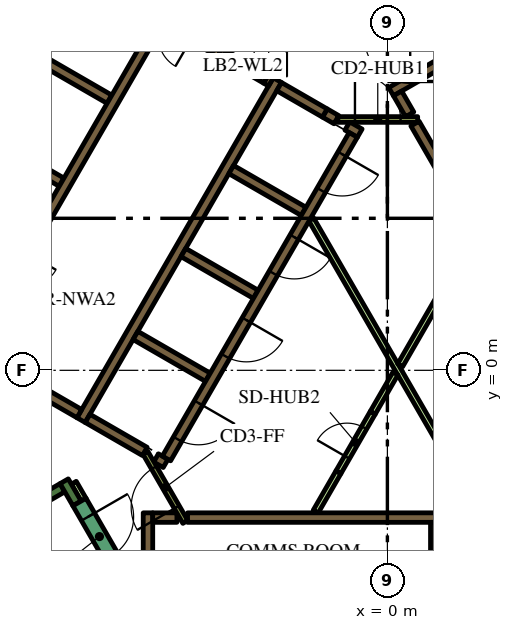
"""IFC4 building model, lengths in metres.
Left out: names, types, materials, properties, quantities, classifications, styles, units other than length and angle.
Written with IfcOpenShell. Run it as: python <this file> out.ifc"""

import sys

from ifc_helpers import new_model, si_unit, direction, frame, frame_2d, origin, place, context, subcontext, project, spatial, polyline, rectangle, outline, extrude, element, fill, save


model = new_model("IFC4")
c1 = context("Model", 3, precision=1e-05, world=origin(), true_north=direction((0.0, 1.0)))
c2 = subcontext(c1, "Body", "Model", "MODEL_VIEW")
j1 = project(units=[si_unit("LENGTHUNIT", "METRE"), si_unit("PLANEANGLEUNIT", "RADIAN")], contexts=[c1])
p1 = place(None, origin())
s1 = spatial("IfcSite", under=j1, at=p1, CompositionType="ELEMENT")
p2 = place(p1, origin())
s2 = spatial("IfcBuilding", under=s1, at=p2, CompositionType="ELEMENT")
p3 = place(p2, frame((0.0, 0.0, 51.0)))
s3 = spatial("IfcBuildingStorey", under=s2, at=p3, CompositionType="ELEMENT", Elevation=51.0)
p4 = place(p3, frame((-15.36, -1.503, 0.0), z_axis=(0.0, 0.0, 1.0), x_axis=(0.50000389221, 0.866023156604, 0.0)))
e1 = element("IfcWall", 1, at=p4, inside=s3, PredefinedType="SOLIDWALL", context=c2, shape_type="SweptSolid", body=[
    extrude(rectangle(XDim=21.0, YDim=0.9, at=frame_2d((10.5, 0.0))), origin(), (0.0, 0.0, 1.0), 3.9),
])
p5 = place(p3, frame((-14.44, -6.49, 0.0), z_axis=(0.0, 0.0, 1.0), x_axis=(0.866022966069, 0.500004222222, 0.0)))
e2 = element("IfcWall", 2, at=p5, inside=s3, PredefinedType="SOLIDWALL", context=c2, shape_type="SweptSolid", body=[
    extrude(rectangle(XDim=6.8, YDim=0.25, at=frame_2d((3.4, 0.0))), origin(), (0.0, 0.0, 1.0), 3.9),
])
p6 = place(p3, frame((-8.168, -3.503, 0.0), z_axis=(0.0, 0.0, 1.0), x_axis=(-0.499952099219, 0.866053057547, 0.0)))
e3 = element("IfcWall", 3, at=p6, inside=s3, PredefinedType="SOLIDWALL", context=c2, shape_type="SweptSolid", body=[
    extrude(rectangle(XDim=0.675, YDim=0.25, at=frame_2d((0.337, 0.0))), origin(), (0.0, 0.0, 1.0), 3.9),
])
p7 = place(p3, frame((-5.259, -3.875, 0.0), z_axis=(0.0, 0.0, 1.0), x_axis=(1.0, 0.0, 0.0)))
e4 = element("IfcWall", 4, at=p7, inside=s3, PredefinedType="SOLIDWALL", context=c2, shape_type="SweptSolid", body=[
    extrude(rectangle(XDim=10.489, YDim=0.25, at=frame_2d((5.244, 0.0))), origin(), (0.0, 0.0, 1.0), 3.9),
])
p8 = place(p3, frame((1.26, -4.0, 0.0), z_axis=(0.0, 0.0, 1.0), x_axis=(0.0, -1.0, 0.0)))
e5 = element("IfcWall", 5, at=p8, inside=s3, PredefinedType="SOLIDWALL", context=c2, shape_type="SweptSolid", body=[
    extrude(rectangle(XDim=2.2, YDim=0.25, at=frame_2d((1.1, 0.0))), origin(), (0.0, 0.0, 1.0), 3.9),
])
p9 = place(p3, frame((-6.3, -3.75, 0.0), z_axis=(0.0, 0.0, 1.0), x_axis=(0.0, -1.0, 0.0)))
e6 = element("IfcWall", 6, at=p9, inside=s3, PredefinedType="SOLIDWALL", context=c2, shape_type="SweptSolid", body=[
    extrude(rectangle(XDim=3.404, YDim=0.25, at=frame_2d((1.702, 0.0))), origin(), (0.0, 0.0, 1.0), 3.9),
])
p10 = place(p3, frame((-6.175, -3.875, 0.0), z_axis=(0.0, 0.0, 1.0), x_axis=(1.0, 0.0, 0.0)))
e7 = element("IfcWall", 7, at=p10, inside=s3, PredefinedType="SOLIDWALL", context=c2, shape_type="SweptSolid", body=[
    extrude(rectangle(XDim=0.637, YDim=0.25, at=frame_2d((0.318, 0.0))), origin(), (0.0, 0.0, 1.0), 3.9),
])
p11 = place(p3, origin())
e8 = element("IfcWall", 8, at=p11, inside=s3, PredefinedType="SOLIDWALL", context=c2, shape_type="SweptSolid", body=[
    extrude(outline(polyline([(2.776, 8.733), (2.499, 8.573), (2.498, 8.573), (2.498, 8.573), (2.282, 8.448), (2.282, 8.448), (0.377, 7.348), (0.16, 7.223), (0.035, 7.439), (3.032, 9.169), (3.03, 9.152), (3.03, 9.133), (3.031, 9.113), (3.035, 9.094), (3.04, 9.075), (3.047, 9.057), (3.056, 9.039), (3.119, 8.931), (2.776, 8.733)])), origin(), (0.0, 0.0, 1.0), 3.9),
])
p12 = place(p3, frame((0.268, 7.285, 0.0), z_axis=(0.0, 0.0, 1.0), x_axis=(0.500098681536, -0.865968422476, 0.0)))
e9 = element("IfcWall", 9, at=p12, inside=s3, PredefinedType="SOLIDWALL", context=c2, shape_type="SweptSolid", body=[
    extrude(rectangle(XDim=0.636, YDim=0.25, at=frame_2d((0.318, 0.0))), origin(), (0.0, 0.0, 1.0), 3.9),
])
p13 = place(p3, frame((5.97, -2.591, 0.0), z_axis=(0.0, 0.0, 1.0), x_axis=(-0.499994469932, 0.866028596547, 0.0)))
e10 = element("IfcWall", 10, at=p13, inside=s3, PredefinedType="SOLIDWALL", context=c2, shape_type="SweptSolid", body=[
    extrude(rectangle(XDim=10.488, YDim=0.25, at=frame_2d((5.244, 0.0))), origin(), (0.0, 0.0, 1.0), 3.9),
])
p14 = place(p3, frame((-8.06, -1.311, 0.0), z_axis=(0.0, 0.0, 1.0), x_axis=(0.50000273126, 0.866023826885, 0.0)))
e11 = element("IfcWall", 11, at=p14, inside=s3, PredefinedType="SOLIDWALL", context=c2, shape_type="SweptSolid", body=[
    extrude(rectangle(XDim=10.33, YDim=0.25, at=frame_2d((5.165, 0.0))), origin(), (0.0, 0.0, 1.0), 3.9),
])
p15 = place(p3, frame((-1.342, 6.595, 0.0), z_axis=(0.0, 0.0, 1.0), x_axis=(-0.866046247233, 0.49996389635, 0.0)))
e12 = element("IfcWall", 12, at=p15, inside=s3, PredefinedType="SOLIDWALL", context=c2, shape_type="SweptSolid", body=[
    extrude(rectangle(XDim=0.35, YDim=0.25, at=frame_2d((0.175, 0.0))), origin(), (0.0, 0.0, 1.0), 3.9),
])
p16 = place(p3, frame((-1.647, 6.771, 0.0), z_axis=(0.0, 0.0, 1.0), x_axis=(-0.865971728693, 0.500092956464, 0.0)))
e13 = element("IfcWall", 13, at=p16, inside=s3, PredefinedType="SOLIDWALL", context=c2, shape_type="SweptSolid", body=[
    extrude(rectangle(XDim=1.388, YDim=0.25, at=frame_2d((0.694, 0.0))), origin(), (0.0, 0.0, 1.0), 3.9),
])
p17 = place(p3, frame((-0.728, 6.24, 0.0), z_axis=(0.0, 0.0, 1.0), x_axis=(-0.866088799389, 0.499890179513, 0.0)))
e14 = element("IfcWall", 14, at=p17, inside=s3, PredefinedType="SOLIDWALL", context=c2, shape_type="SweptSolid", body=[
    extrude(rectangle(XDim=0.378, YDim=0.25, at=frame_2d((0.189, 0.0))), origin(), (0.0, 0.0, 1.0), 3.9),
])
for number, where, z_axis, x_axis in (
    (15, (-2.204, 4.182, 0.0), (0.0, 0.0, 1.0), (-0.866, 0.5, 0.0)),
    (16, (-5.369, 3.1, 0.0), (0.0, 0.0, 1.0), (0.866, -0.5, 0.0)),
    (17, (-4.724, -0.182, 0.0), (0.0, 0.0, 1.0), (-0.866, 0.5, 0.0)),
):
    element("IfcWall", number, at=place(p3, frame(where, z_axis=z_axis, x_axis=x_axis)), inside=s3, PredefinedType="SOLIDWALL", context=c2, shape_type="SweptSolid", body=[
        extrude(rectangle(XDim=2.2, YDim=0.25, at=frame_2d((1.1, 0.0))), origin(), (0.0, 0.0, 1.0), 3.9),
    ])
p18 = place(p3, frame((-6.088, -2.305, 0.0), z_axis=(0.0, 0.0, 1.0), x_axis=(0.866059450854, -0.499941024108, 0.0)))
e18 = element("IfcWall", 18, at=p18, inside=s3, PredefinedType="SOLIDWALL", context=c2, shape_type="SweptSolid", body=[
    extrude(rectangle(XDim=0.29, YDim=0.25, at=frame_2d((0.145, 0.0))), origin(), (0.0, 0.0, 1.0), 3.9),
])
p19 = place(p3, frame((-7.889, -1.265, 0.0), z_axis=(0.0, 0.0, 1.0), x_axis=(0.865986741702, -0.500066958712, 0.0)))
e19 = element("IfcWall", 19, at=p19, inside=s3, PredefinedType="SOLIDWALL", context=c2, shape_type="SweptSolid", body=[
    extrude(rectangle(XDim=1.738, YDim=0.25, at=frame_2d((0.869, 0.0))), origin(), (0.0, 0.0, 1.0), 3.9),
])
p20 = place(p3, frame((-8.106, -1.14, 0.0), z_axis=(0.0, 0.0, 1.0), x_axis=(-0.866000643155, 0.500042884217, 0.0)))
e20 = element("IfcWall", 20, at=p20, inside=s3, PredefinedType="SOLIDWALL", context=c2, shape_type="SweptSolid", body=[
    extrude(rectangle(XDim=5.65, YDim=0.25, at=frame_2d((2.825, 0.0))), origin(), (0.0, 0.0, 1.0), 3.9),
])
e21 = element("IfcWall", 21, at=p11, inside=s3, PredefinedType="SOLIDWALL", context=c2, shape_type="SweptSolid", body=[
    extrude(outline(polyline([(-3.128, 7.481), (-3.259, 7.557), (-3.134, 7.773), (-3.003, 7.698), (-3.128, 7.481)])), origin(), (0.0, 0.0, 1.0), 3.9),
])
for number, where, z_axis, x_axis in (
    (22, (-8.574, 4.95, 0.0), (0.0, 0.0, 1.0), (-0.866, 0.5, 0.0)),
    (23, (-7.314, 7.132, 0.0), (0.0, 0.0, 1.0), (-0.866, 0.5, 0.0)),
):
    element("IfcWall", number, at=place(p3, frame(where, z_axis=z_axis, x_axis=x_axis)), inside=s3, PredefinedType="SOLIDWALL", context=c2, shape_type="SweptSolid", body=[
        extrude(rectangle(XDim=2.2, YDim=0.25, at=frame_2d((1.1, 0.0))), origin(), (0.0, 0.0, 1.0), 3.9),
    ])
p21 = place(p3, frame((-4.409, 8.365, 0.0), z_axis=(0.0, 0.0, 1.0), x_axis=(-0.866057014183, 0.499945245186, 0.0)))
e24 = element("IfcWall", 24, at=p21, inside=s3, PredefinedType="SOLIDWALL", context=c2, shape_type="SweptSolid", body=[
    extrude(rectangle(XDim=0.379, YDim=0.25, at=frame_2d((0.19, 0.0))), origin(), (0.0, 0.0, 1.0), 3.9),
])
p22 = place(p3, frame((-1.887, -3.718, 0.0), z_axis=(0.0, 0.0, 1.0), x_axis=(0.500057179532, 0.865992388649, 0.0)))
e25 = element("IfcWall", 25, at=p22, inside=s3, PredefinedType="PARTITIONING", context=c2, shape_type="SweptSolid", body=[
    extrude(rectangle(XDim=1.199, YDim=0.15, at=frame_2d((0.6, 0.0))), origin(), (0.0, 0.0, 1.0), 2.75),
])
p23 = place(p3, frame((-8.252, -2.958, 0.0), z_axis=(0.0, 0.0, 1.0), x_axis=(0.500174715838, -0.865924508047, 0.0)))
e26 = element("IfcWall", 26, at=p23, inside=s3, PredefinedType="PARTITIONING", context=c2, shape_type="SweptSolid", body=[
    extrude(rectangle(XDim=0.514, YDim=0.15, at=frame_2d((0.257, 0.0))), origin(), (0.0, 0.0, 1.0), 2.75),
])
p24 = place(p3, frame((2.435, -3.718, 0.0), z_axis=(0.0, 0.0, 1.0), x_axis=(-0.499985176046, 0.866033962229, 0.0)))
e27 = element("IfcWall", 27, at=p24, inside=s3, PredefinedType="PARTITIONING", context=c2, shape_type="SweptSolid", body=[
    extrude(rectangle(XDim=8.875, YDim=0.15, at=frame_2d((4.438, 0.0))), origin(), (0.0, 0.0, 1.0), 2.75),
])
p25 = place(p3, frame((0.336, 0.132, 0.0), z_axis=(0.0, 0.0, 1.0), x_axis=(0.500001957507, 0.866024273614, 0.0)))
e28 = element("IfcWall", 28, at=p25, inside=s3, PredefinedType="PARTITIONING", context=c2, shape_type="SweptSolid", body=[
    extrude(rectangle(XDim=3.881, YDim=0.15, at=frame_2d((1.941, 0.0))), origin(), (0.0, 0.0, 1.0), 2.75),
])
p26 = place(p3, frame((-0.387, -1.121, 0.0), z_axis=(0.0, 0.0, 1.0), x_axis=(0.500057179532, 0.865992388649, 0.0)))
e29 = element("IfcWall", 29, at=p26, inside=s3, PredefinedType="PARTITIONING", context=c2, shape_type="SweptSolid", body=[
    extrude(rectangle(XDim=1.199, YDim=0.15, at=frame_2d((0.6, 0.0))), origin(), (0.0, 0.0, 1.0), 2.75),
])
p27 = place(p3, frame((-6.008, 9.144, 0.0), z_axis=(0.0, 0.0, 1.0), x_axis=(-0.500006956611, -0.866021387346, 0.0)))
e30 = element("IfcWall", 30, at=p27, inside=s3, PredefinedType="SOLIDWALL", context=c2, shape_type="SweptSolid", body=[
    extrude(rectangle(XDim=9.83, YDim=0.25, at=frame_2d((4.915, 0.0))), origin(), (0.0, 0.0, 1.0), 3.9),
])
p28 = place(p27, frame((6.985, 0.0, 0.0)))
e31 = element("IfcOpeningElement", 31, at=p28, cuts=e30, PredefinedType="OPENING", context=c2, shape_type="SweptSolid", body=[
    extrude(rectangle(XDim=0.9, YDim=2.1, at=frame_2d((0.45, 1.05))), frame((0.0, 0.135, 0.0), z_axis=(0.0, -1.0, 0.0), x_axis=(1.0, 0.0, 0.0)), (0.0, 0.0, 1.0), 0.27),
])
p29 = place(p3, frame((-0.898, 6.194, 0.0), z_axis=(0.0, 0.0, 1.0), x_axis=(-0.499996202215, -0.866027596426, 0.0)))
e32 = element("IfcWall", 32, at=p29, inside=s3, PredefinedType="SOLIDWALL", context=c2, shape_type="SweptSolid", body=[
    extrude(rectangle(XDim=9.83, YDim=0.25, at=frame_2d((4.915, 0.0))), origin(), (0.0, 0.0, 1.0), 3.9),
])
p30 = place(p29, frame((0.585, 0.0, 0.0)))
e33 = element("IfcOpeningElement", 33, at=p30, cuts=e32, PredefinedType="OPENING", context=c2, shape_type="SweptSolid", body=[
    extrude(rectangle(XDim=1.1, YDim=2.1, at=frame_2d((0.55, 1.05))), frame((0.0, 0.135, 0.0), z_axis=(0.0, -1.0, 0.0), x_axis=(1.0, 0.0, 0.0)), (0.0, 0.0, 1.0), 0.27),
])
p31 = place(p29, frame((3.105, 0.0, 0.0)))
e34 = element("IfcOpeningElement", 34, at=p31, cuts=e32, PredefinedType="OPENING", context=c2, shape_type="SweptSolid", body=[
    extrude(rectangle(XDim=1.1, YDim=2.1, at=frame_2d((0.55, 1.05))), frame((0.0, 0.135, 0.0), z_axis=(0.0, -1.0, 0.0), x_axis=(1.0, 0.0, 0.0)), (0.0, 0.0, 1.0), 0.27),
])
p32 = place(p29, frame((5.625, 0.0, 0.0)))
e35 = element("IfcOpeningElement", 35, at=p32, cuts=e32, PredefinedType="OPENING", context=c2, shape_type="SweptSolid", body=[
    extrude(rectangle(XDim=1.1, YDim=2.1, at=frame_2d((0.55, 1.05))), frame((0.0, 0.135, 0.0), z_axis=(0.0, -1.0, 0.0), x_axis=(1.0, 0.0, 0.0)), (0.0, 0.0, 1.0), 0.27),
])
p33 = place(p29, frame((8.145, 0.0, 0.0)))
e36 = element("IfcOpeningElement", 36, at=p33, cuts=e32, PredefinedType="OPENING", context=c2, shape_type="SweptSolid", body=[
    extrude(rectangle(XDim=1.1, YDim=2.1, at=frame_2d((0.55, 1.05))), frame((0.0, 0.135, 0.0), z_axis=(0.0, -1.0, 0.0), x_axis=(1.0, 0.0, 0.0)), (0.0, 0.0, 1.0), 0.27),
])
p34 = place(p3, frame((-8.103, -3.466, 0.0), z_axis=(0.0, 0.0, 1.0), x_axis=(0.500078061341, -0.865980330357, 0.0)))
e37 = element("IfcWall", 37, at=p34, inside=s3, PredefinedType="SOLIDWALL", context=c2, shape_type="SweptSolid", body=[
    extrude(rectangle(XDim=2.1, YDim=0.4, at=frame_2d((1.05, 0.0))), origin(), (0.0, 0.0, 1.0), 3.9),
])
p35 = place(p34, frame((0.45, 0.0, 0.0)))
e38 = element("IfcOpeningElement", 38, at=p35, cuts=e37, PredefinedType="OPENING", context=c2, shape_type="SweptSolid", body=[
    extrude(rectangle(XDim=1.2, YDim=2.1, at=frame_2d((0.6, 1.05))), frame((0.0, 0.21, 0.0), z_axis=(0.0, -1.0, 0.0), x_axis=(1.0, 0.0, 0.0)), (0.0, 0.0, 1.0), 0.42),
])
p36 = place(p3, frame((-1.303, 6.6, 0.0), z_axis=(0.0, 0.0, 1.0), x_axis=(1.0, 0.0, 0.0)))
e39 = element("IfcWall", 39, at=p36, inside=s3, PredefinedType="PARTITIONING", context=c2, shape_type="SweptSolid", body=[
    extrude(rectangle(XDim=2.1, YDim=0.15, at=frame_2d((1.05, 0.0))), origin(), (0.0, 0.0, 1.0), 3.9),
])
p37 = place(p36, frame((0.45, 0.0, 0.0)))
e40 = element("IfcOpeningElement", 40, at=p37, cuts=e39, PredefinedType="OPENING", context=c2, shape_type="SweptSolid", body=[
    extrude(rectangle(XDim=1.2, YDim=2.1, at=frame_2d((0.6, 1.05))), frame((0.0, 0.085, 0.0), z_axis=(0.0, -1.0, 0.0), x_axis=(1.0, 0.0, 0.0)), (0.0, 0.0, 1.0), 0.17),
])
p38 = place(p3, frame((-5.317, -3.99, 0.0), z_axis=(0.0, 0.0, 1.0), x_axis=(-0.500027713859, 0.866009402589, 0.0)))
e41 = element("IfcWall", 41, at=p38, inside=s3, PredefinedType="PARTITIONING", context=c2, shape_type="SweptSolid", body=[
    extrude(rectangle(XDim=2.1, YDim=0.15, at=frame_2d((1.05, 0.0))), origin(), (0.0, 0.0, 1.0), 3.9),
])
p39 = place(p38, frame((0.45, 0.0, 0.0)))
e42 = element("IfcOpeningElement", 42, at=p39, cuts=e41, PredefinedType="OPENING", context=c2, shape_type="SweptSolid", body=[
    extrude(rectangle(XDim=1.2, YDim=2.1, at=frame_2d((0.6, 1.05))), frame((0.0, 0.085, 0.0), z_axis=(0.0, -1.0, 0.0), x_axis=(1.0, 0.0, 0.0)), (0.0, 0.0, 1.0), 0.17),
])
p40 = place(p3, frame((-4.409, 8.365, 0.0), z_axis=(0.0, 0.0, 1.0), x_axis=(0.866034573852, -0.49998411664, 0.0)))
e43 = element("IfcWall", 43, at=p40, inside=s3, PredefinedType="SOLIDWALL", context=c2, shape_type="SweptSolid", body=[
    extrude(rectangle(XDim=1.4, YDim=0.25, at=frame_2d((0.7, 0.0))), origin(), (0.0, 0.0, 1.0), 3.9),
])
p41 = place(p40, frame((0.1, 0.0, 0.0)))
e44 = element("IfcOpeningElement", 44, at=p41, cuts=e43, PredefinedType="OPENING", context=c2, shape_type="SweptSolid", body=[
    extrude(rectangle(XDim=1.2, YDim=2.1, at=frame_2d((0.6, 1.05))), frame((0.0, 0.135, 0.0), z_axis=(0.0, -1.0, 0.0), x_axis=(1.0, 0.0, 0.0)), (0.0, 0.0, 1.0), 0.27),
])
p42 = place(p3, frame((-1.287, -2.679, 0.0), z_axis=(0.0, 0.0, 1.0), x_axis=(0.499961193289, 0.866047807691, 0.0)))
e45 = element("IfcWall", 45, at=p42, inside=s3, PredefinedType="PARTITIONING", context=c2, shape_type="SweptSolid", body=[
    extrude(rectangle(XDim=1.8, YDim=0.15, at=frame_2d((0.9, 0.0))), origin(), (0.0, 0.0, 1.0), 2.75),
])
p43 = place(p42, frame((0.45, 0.0, 0.0)))
e46 = element("IfcOpeningElement", 46, at=p43, cuts=e45, PredefinedType="OPENING", context=c2, shape_type="SweptSolid", body=[
    extrude(rectangle(XDim=0.9, YDim=2.1, at=frame_2d((0.45, 1.05))), frame((0.0, 0.085, 0.0), z_axis=(0.0, -1.0, 0.0), x_axis=(1.0, 0.0, 0.0)), (0.0, 0.0, 1.0), 0.17),
])
p44 = place(p3, frame((-19.081, -3.9, 0.0), z_axis=(0.0, 0.0, 1.0), x_axis=(0.499998313975, 0.866026377209, 0.0)))
e47 = element("IfcWall", 47, at=p44, inside=s3, PredefinedType="PARTITIONING", context=c2, shape_type="SweptSolid", body=[
    extrude(rectangle(XDim=25.766, YDim=0.15, at=frame_2d((12.883, 0.0))), origin(), (0.0, 0.0, 1.0), 2.75),
])
p45 = place(p44, frame((22.445, 0.0, 0.0)))
e48 = element("IfcOpeningElement", 48, at=p45, cuts=e47, PredefinedType="OPENING", context=c2, shape_type="SweptSolid", body=[
    extrude(rectangle(XDim=1.0, YDim=2.1, at=frame_2d((0.5, 1.05))), frame((0.0, 0.085, 0.0), z_axis=(0.0, -1.0, 0.0), x_axis=(1.0, 0.0, 0.0)), (0.0, 0.0, 1.0), 0.17),
])
p46 = place(p44, frame((21.138, 0.0, 0.0)))
e49 = element("IfcOpeningElement", 49, at=p46, cuts=e47, PredefinedType="OPENING", context=c2, shape_type="SweptSolid", body=[
    extrude(rectangle(XDim=1.0, YDim=2.1, at=frame_2d((0.5, 1.05))), frame((0.0, 0.085, 0.0), z_axis=(0.0, -1.0, 0.0), x_axis=(1.0, 0.0, 0.0)), (0.0, 0.0, 1.0), 0.17),
])
p47 = place(p44, frame((14.066, 0.0, 0.0)))
e50 = element("IfcOpeningElement", 50, at=p47, cuts=e47, PredefinedType="OPENING", context=c2, shape_type="SweptSolid", body=[
    extrude(rectangle(XDim=0.9, YDim=2.1, at=frame_2d((0.45, 1.05))), frame((0.0, 0.085, 0.0), z_axis=(0.0, -1.0, 0.0), x_axis=(1.0, 0.0, 0.0)), (0.0, 0.0, 1.0), 0.17),
])
p48 = place(p44, frame((11.693, 0.0, 0.0)))
e51 = element("IfcOpeningElement", 51, at=p48, cuts=e47, PredefinedType="OPENING", context=c2, shape_type="SweptSolid", body=[
    extrude(rectangle(XDim=1.0, YDim=2.1, at=frame_2d((0.5, 1.05))), frame((0.0, 0.085, 0.0), z_axis=(0.0, -1.0, 0.0), x_axis=(1.0, 0.0, 0.0)), (0.0, 0.0, 1.0), 0.17),
])
p49 = place(p30, origin())
e52 = element("IfcDoor", 52, at=p49, inside=s3, OperationType="DOUBLE_DOOR_SLIDING", PredefinedType="DOOR", context=c2, shape_type="SweptSolid", body=[
    extrude(rectangle(XDim=1.1, YDim=2.1, at=frame_2d((0.55, 1.05))), frame((0.0, 0.025, 0.0), z_axis=(0.0, -1.0, 0.0), x_axis=(1.0, 0.0, 0.0)), (0.0, 0.0, 1.0), 0.05),
])
fill(e33, e52)
p50 = place(p31, origin())
e53 = element("IfcDoor", 53, at=p50, inside=s3, OperationType="DOUBLE_DOOR_SLIDING", PredefinedType="DOOR", context=c2, shape_type="SweptSolid", body=[
    extrude(rectangle(XDim=1.1, YDim=2.1, at=frame_2d((0.55, 1.05))), frame((0.0, 0.025, 0.0), z_axis=(0.0, -1.0, 0.0), x_axis=(1.0, 0.0, 0.0)), (0.0, 0.0, 1.0), 0.05),
])
fill(e34, e53)
p51 = place(p32, origin())
e54 = element("IfcDoor", 54, at=p51, inside=s3, OperationType="DOUBLE_DOOR_SLIDING", PredefinedType="DOOR", context=c2, shape_type="SweptSolid", body=[
    extrude(rectangle(XDim=1.1, YDim=2.1, at=frame_2d((0.55, 1.05))), frame((0.0, 0.025, 0.0), z_axis=(0.0, -1.0, 0.0), x_axis=(1.0, 0.0, 0.0)), (0.0, 0.0, 1.0), 0.05),
])
fill(e35, e54)
p52 = place(p33, origin())
e55 = element("IfcDoor", 55, at=p52, inside=s3, OperationType="DOUBLE_DOOR_SLIDING", PredefinedType="DOOR", context=c2, shape_type="SweptSolid", body=[
    extrude(rectangle(XDim=1.1, YDim=2.1, at=frame_2d((0.55, 1.05))), frame((0.0, 0.025, 0.0), z_axis=(0.0, -1.0, 0.0), x_axis=(1.0, 0.0, 0.0)), (0.0, 0.0, 1.0), 0.05),
])
fill(e36, e55)
p53 = place(p35, origin())
e56 = element("IfcDoor", 56, at=p53, inside=s3, OperationType="SINGLE_SWING_LEFT", PredefinedType="DOOR", context=c2, shape_type="SweptSolid", body=[
    extrude(rectangle(XDim=1.2, YDim=2.1, at=frame_2d((0.6, 1.05))), frame((0.0, 0.025, 0.0), z_axis=(0.0, -1.0, 0.0), x_axis=(1.0, 0.0, 0.0)), (0.0, 0.0, 1.0), 0.05),
])
fill(e38, e56)
p54 = place(p37, origin())
e57 = element("IfcDoor", 57, at=p54, inside=s3, OperationType="SINGLE_SWING_LEFT", PredefinedType="DOOR", context=c2, shape_type="SweptSolid", body=[
    extrude(rectangle(XDim=1.2, YDim=2.1, at=frame_2d((0.6, 1.05))), frame((0.0, 0.025, 0.0), z_axis=(0.0, -1.0, 0.0), x_axis=(1.0, 0.0, 0.0)), (0.0, 0.0, 1.0), 0.05),
])
fill(e40, e57)
p55 = place(p39, origin())
e58 = element("IfcDoor", 58, at=p55, inside=s3, OperationType="SINGLE_SWING_LEFT", PredefinedType="DOOR", context=c2, shape_type="SweptSolid", body=[
    extrude(rectangle(XDim=1.2, YDim=2.1, at=frame_2d((0.6, 1.05))), frame((0.0, 0.025, 0.0), z_axis=(0.0, -1.0, 0.0), x_axis=(1.0, 0.0, 0.0)), (0.0, 0.0, 1.0), 0.05),
])
fill(e42, e58)
p56 = place(p41, origin())
e59 = element("IfcDoor", 59, at=p56, inside=s3, OperationType="SINGLE_SWING_LEFT", PredefinedType="DOOR", context=c2, shape_type="SweptSolid", body=[
    extrude(rectangle(XDim=1.2, YDim=2.1, at=frame_2d((0.6, 1.05))), frame((0.0, 0.025, 0.0), z_axis=(0.0, -1.0, 0.0), x_axis=(1.0, 0.0, 0.0)), (0.0, 0.0, 1.0), 0.05),
])
fill(e44, e59)
p57 = place(p43, origin())
e60 = element("IfcDoor", 60, at=p57, inside=s3, OperationType="SINGLE_SWING_LEFT", PredefinedType="DOOR", context=c2, shape_type="SweptSolid", body=[
    extrude(rectangle(XDim=0.9, YDim=2.1, at=frame_2d((0.45, 1.05))), frame((0.0, 0.025, 0.0), z_axis=(0.0, -1.0, 0.0), x_axis=(1.0, 0.0, 0.0)), (0.0, 0.0, 1.0), 0.05),
])
fill(e46, e60)
save(model, sys.argv[1])
